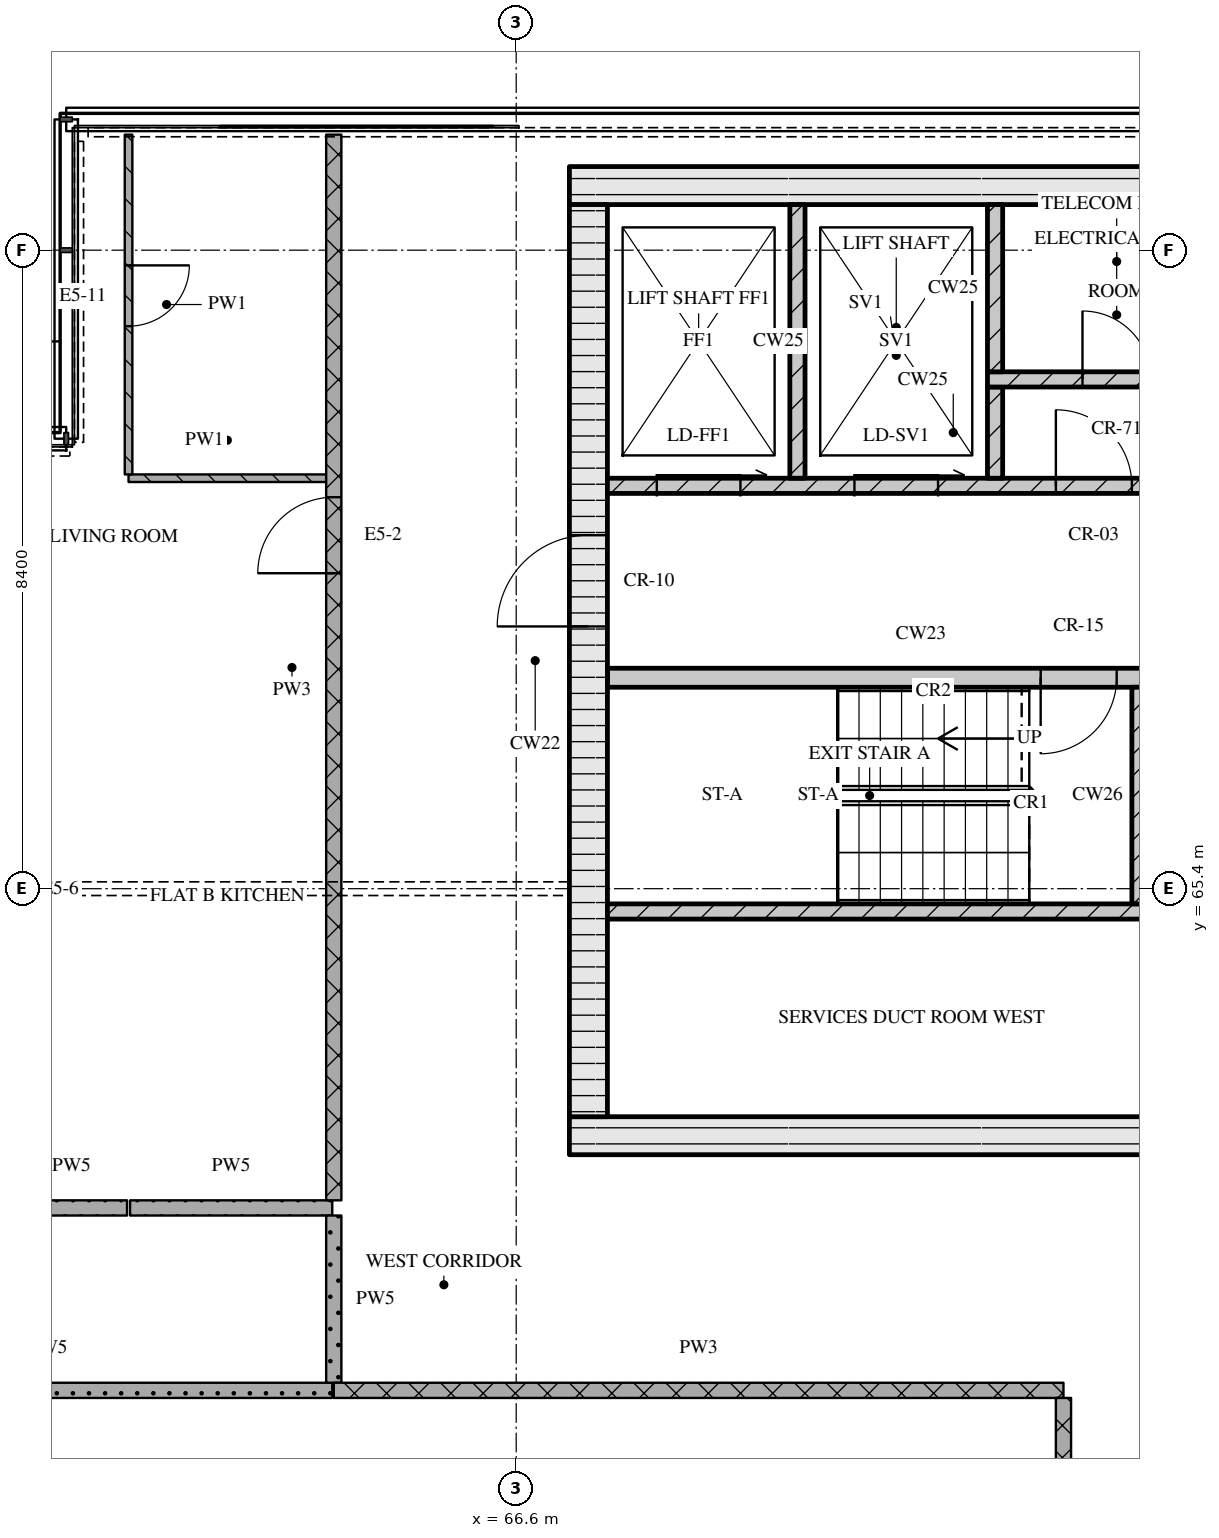
"""IFC4 building model, lengths in metres.
Left out: names, types, materials, properties, quantities, classifications, styles, units other than length and angle.
Written with IfcOpenShell. Run it as: python <this file> out.ifc"""

import sys

from ifc_helpers import new_model, si_unit, direction, frame, frame_2d, origin, place, context, subcontext, project, spatial, rectangle, extrude, element, fill, save


model = new_model("IFC4")
c1 = context("Model", 3, precision=1e-05, world=origin(), true_north=direction((0.0, 1.0)))
c2 = subcontext(c1, "Body", "Model", "MODEL_VIEW")
j1 = project(units=[si_unit("LENGTHUNIT", "METRE"), si_unit("PLANEANGLEUNIT", "RADIAN")], contexts=[c1])
p1 = place(None, origin())
s1 = spatial("IfcSite", under=j1, at=p1, CompositionType="ELEMENT")
p2 = place(p1, origin())
s2 = spatial("IfcBuilding", under=s1, at=p2, CompositionType="ELEMENT")
p3 = place(p2, frame((0.0, 0.0, 288.75)))
s3 = spatial("IfcBuildingStorey", under=s2, at=p3, CompositionType="ELEMENT", Elevation=288.75)
p4 = place(p3, frame((67.3, 62.15, 0.0), z_axis=(0.0, 0.0, 1.0), x_axis=(1.0, 0.0, 0.0)))
e1 = element("IfcWall", 1, at=p4, inside=s3, PredefinedType="SOLIDWALL", context=c2, shape_type="SweptSolid", body=[
    extrude(rectangle(XDim=40.6, YDim=0.5, at=frame_2d((20.3, 0.0))), origin(), (0.0, 0.0, 1.0), 3.32),
])
p5 = place(p4, frame((20.65, 0.0, 0.0)))
e2 = element("IfcOpeningElement", 2, at=p5, cuts=e1, PredefinedType="OPENING", context=c2, shape_type="SweptSolid", body=[
    extrude(rectangle(XDim=1.8, YDim=2.1, at=frame_2d((0.9, 1.05))), frame((0.0, 0.26, 0.0), z_axis=(0.0, -1.0, 0.0), x_axis=(1.0, 0.0, 0.0)), (0.0, 0.0, 1.0), 0.52),
])
p6 = place(p3, frame((67.3, 74.65, 0.0), z_axis=(0.0, 0.0, 1.0), x_axis=(1.0, 0.0, 0.0)))
e3 = element("IfcWall", 3, at=p6, inside=s3, PredefinedType="SOLIDWALL", context=c2, shape_type="SweptSolid", body=[
    extrude(rectangle(XDim=40.6, YDim=0.5, at=frame_2d((20.3, 0.0))), origin(), (0.0, 0.0, 1.0), 3.32),
])
p7 = place(p3, frame((67.55, 62.4, 0.0), z_axis=(0.0, 0.0, 1.0), x_axis=(0.0, 1.0, 0.0)))
e4 = element("IfcWall", 4, at=p7, inside=s3, PredefinedType="SOLIDWALL", context=c2, shape_type="SweptSolid", body=[
    extrude(rectangle(XDim=12.0, YDim=0.5, at=frame_2d((6.0, 0.0))), origin(), (0.0, 0.0, 1.0), 3.32),
])
p8 = place(p7, frame((6.45, 0.0, 0.0)))
e5 = element("IfcOpeningElement", 5, at=p8, cuts=e4, PredefinedType="OPENING", context=c2, shape_type="SweptSolid", body=[
    extrude(rectangle(XDim=1.2, YDim=2.1, at=frame_2d((0.6, 1.05))), frame((0.0, 0.26, 0.0), z_axis=(0.0, -1.0, 0.0), x_axis=(1.0, 0.0, 0.0)), (0.0, 0.0, 1.0), 0.52),
])
p9 = place(p3, frame((67.8, 65.1, 0.0), z_axis=(0.0, 0.0, 1.0), x_axis=(1.0, 0.0, 0.0)))
e6 = element("IfcWall", 6, at=p9, inside=s3, PredefinedType="SOLIDWALL", context=c2, shape_type="SweptSolid", body=[
    extrude(rectangle(XDim=18.5, YDim=0.2, at=frame_2d((9.25, 0.0))), origin(), (0.0, 0.0, 1.0), 3.32),
])
p10 = place(p9, frame((7.27, 0.0, 0.0)))
e7 = element("IfcOpeningElement", 7, at=p10, cuts=e6, PredefinedType="OPENING", context=c2, shape_type="SweptSolid", body=[
    extrude(rectangle(XDim=0.9, YDim=2.1, at=frame_2d((0.45, 1.05))), frame((0.0, 0.11, 0.0), z_axis=(0.0, -1.0, 0.0), x_axis=(1.0, 0.0, 0.0)), (0.0, 0.0, 1.0), 0.22),
])
p11 = place(p9, frame((8.95, 0.0, 0.0)))
e8 = element("IfcOpeningElement", 8, at=p11, cuts=e6, PredefinedType="OPENING", context=c2, shape_type="SweptSolid", body=[
    extrude(rectangle(XDim=0.9, YDim=2.1, at=frame_2d((0.45, 1.05))), frame((0.0, 0.11, 0.0), z_axis=(0.0, -1.0, 0.0), x_axis=(1.0, 0.0, 0.0)), (0.0, 0.0, 1.0), 0.22),
])
p12 = place(p9, frame((11.42, 0.0, 0.0)))
e9 = element("IfcOpeningElement", 9, at=p12, cuts=e6, PredefinedType="OPENING", context=c2, shape_type="SweptSolid", body=[
    extrude(rectangle(XDim=0.9, YDim=2.1, at=frame_2d((0.45, 1.05))), frame((0.0, 0.11, 0.0), z_axis=(0.0, -1.0, 0.0), x_axis=(1.0, 0.0, 0.0)), (0.0, 0.0, 1.0), 0.22),
])
p13 = place(p9, frame((13.92, 0.0, 0.0)))
e10 = element("IfcOpeningElement", 10, at=p13, cuts=e6, PredefinedType="OPENING", context=c2, shape_type="SweptSolid", body=[
    extrude(rectangle(XDim=0.9, YDim=2.1, at=frame_2d((0.45, 1.05))), frame((0.0, 0.11, 0.0), z_axis=(0.0, -1.0, 0.0), x_axis=(1.0, 0.0, 0.0)), (0.0, 0.0, 1.0), 0.22),
])
p14 = place(p9, frame((16.7, 0.0, 0.0)))
e11 = element("IfcOpeningElement", 11, at=p14, cuts=e6, PredefinedType="OPENING", context=c2, shape_type="SweptSolid", body=[
    extrude(rectangle(XDim=0.9, YDim=2.1, at=frame_2d((0.45, 1.05))), frame((0.0, 0.11, 0.0), z_axis=(0.0, -1.0, 0.0), x_axis=(1.0, 0.0, 0.0)), (0.0, 0.0, 1.0), 0.22),
])
p15 = place(p3, frame((74.85, 65.2, 0.0), z_axis=(0.0, 0.0, 1.0), x_axis=(0.0, 1.0, 0.0)))
e12 = element("IfcWall", 12, at=p15, inside=s3, PredefinedType="SOLIDWALL", context=c2, shape_type="SweptSolid", body=[
    extrude(rectangle(XDim=2.85, YDim=0.3, at=frame_2d((1.425, 0.0))), origin(), (0.0, 0.0, 1.0), 3.32),
])
p16 = place(p3, frame((67.8, 68.175, 0.0), z_axis=(0.0, 0.0, 1.0), x_axis=(1.0, 0.0, 0.0)))
e13 = element("IfcWall", 13, at=p16, inside=s3, PredefinedType="SOLIDWALL", context=c2, shape_type="SweptSolid", body=[
    extrude(rectangle(XDim=8.25, YDim=0.25, at=frame_2d((4.125, 0.0))), origin(), (0.0, 0.0, 1.0), 3.32),
])
p17 = place(p16, frame((5.7, 0.0, 0.0)))
e14 = element("IfcOpeningElement", 14, at=p17, cuts=e13, PredefinedType="OPENING", context=c2, shape_type="SweptSolid", body=[
    extrude(rectangle(XDim=1.0, YDim=2.1, at=frame_2d((0.5, 1.05))), frame((0.0, 0.135, 0.0), z_axis=(0.0, -1.0, 0.0), x_axis=(1.0, 0.0, 0.0)), (0.0, 0.0, 1.0), 0.27),
])
p18 = place(p16, frame((7.2, 0.0, 0.0)))
e15 = element("IfcOpeningElement", 15, at=p18, cuts=e13, PredefinedType="OPENING", context=c2, shape_type="SweptSolid", body=[
    extrude(rectangle(XDim=0.8, YDim=2.1, at=frame_2d((0.4, 1.05))), frame((0.0, 0.135, 0.0), z_axis=(0.0, -1.0, 0.0), x_axis=(1.0, 0.0, 0.0)), (0.0, 0.0, 1.0), 0.27),
])
p19 = place(p3, frame((67.8, 70.7, 0.0), z_axis=(0.0, 0.0, 1.0), x_axis=(1.0, 0.0, 0.0)))
e16 = element("IfcWall", 16, at=p19, inside=s3, PredefinedType="SOLIDWALL", context=c2, shape_type="SweptSolid", body=[
    extrude(rectangle(XDim=39.6, YDim=0.2, at=frame_2d((19.8, 0.0))), origin(), (0.0, 0.0, 1.0), 3.32),
])
p20 = place(p19, frame((0.65, 0.0, 0.0)))
e17 = element("IfcOpeningElement", 17, at=p20, cuts=e16, PredefinedType="OPENING", context=c2, shape_type="SweptSolid", body=[
    extrude(rectangle(XDim=1.1, YDim=2.1, at=frame_2d((0.55, 1.05))), frame((0.0, 0.11, 0.0), z_axis=(0.0, -1.0, 0.0), x_axis=(1.0, 0.0, 0.0)), (0.0, 0.0, 1.0), 0.22),
])
p21 = place(p19, frame((3.25, 0.0, 0.0)))
e18 = element("IfcOpeningElement", 18, at=p21, cuts=e16, PredefinedType="OPENING", context=c2, shape_type="SweptSolid", body=[
    extrude(rectangle(XDim=1.1, YDim=2.1, at=frame_2d((0.55, 1.05))), frame((0.0, 0.11, 0.0), z_axis=(0.0, -1.0, 0.0), x_axis=(1.0, 0.0, 0.0)), (0.0, 0.0, 1.0), 0.22),
])
p22 = place(p19, frame((5.9, 0.0, 0.0)))
e19 = element("IfcOpeningElement", 19, at=p22, cuts=e16, PredefinedType="OPENING", context=c2, shape_type="SweptSolid", body=[
    extrude(rectangle(XDim=1.0, YDim=2.1, at=frame_2d((0.5, 1.05))), frame((0.0, 0.11, 0.0), z_axis=(0.0, -1.0, 0.0), x_axis=(1.0, 0.0, 0.0)), (0.0, 0.0, 1.0), 0.22),
])
p23 = place(p19, frame((21.7, 0.0, 0.0)))
e20 = element("IfcOpeningElement", 20, at=p23, cuts=e16, PredefinedType="OPENING", context=c2, shape_type="SweptSolid", body=[
    extrude(rectangle(XDim=1.0, YDim=2.1, at=frame_2d((0.5, 1.05))), frame((0.0, 0.11, 0.0), z_axis=(0.0, -1.0, 0.0), x_axis=(1.0, 0.0, 0.0)), (0.0, 0.0, 1.0), 0.22),
])
p24 = place(p19, frame((32.7, 0.0, 0.0)))
e21 = element("IfcOpeningElement", 21, at=p24, cuts=e16, PredefinedType="OPENING", context=c2, shape_type="SweptSolid", body=[
    extrude(rectangle(XDim=1.0, YDim=2.1, at=frame_2d((0.5, 1.05))), frame((0.0, 0.11, 0.0), z_axis=(0.0, -1.0, 0.0), x_axis=(1.0, 0.0, 0.0)), (0.0, 0.0, 1.0), 0.22),
])
p25 = place(p19, frame((35.25, 0.0, 0.0)))
e22 = element("IfcOpeningElement", 22, at=p25, cuts=e16, PredefinedType="OPENING", context=c2, shape_type="SweptSolid", body=[
    extrude(rectangle(XDim=1.1, YDim=2.1, at=frame_2d((0.55, 1.05))), frame((0.0, 0.11, 0.0), z_axis=(0.0, -1.0, 0.0), x_axis=(1.0, 0.0, 0.0)), (0.0, 0.0, 1.0), 0.22),
])
p26 = place(p19, frame((37.85, 0.0, 0.0)))
e23 = element("IfcOpeningElement", 23, at=p26, cuts=e16, PredefinedType="OPENING", context=c2, shape_type="SweptSolid", body=[
    extrude(rectangle(XDim=1.1, YDim=2.1, at=frame_2d((0.55, 1.05))), frame((0.0, 0.11, 0.0), z_axis=(0.0, -1.0, 0.0), x_axis=(1.0, 0.0, 0.0)), (0.0, 0.0, 1.0), 0.22),
])
p27 = place(p3, frame((70.3, 70.8, 0.0), z_axis=(0.0, 0.0, 1.0), x_axis=(0.0, 1.0, 0.0)))
e24 = element("IfcWall", 24, at=p27, inside=s3, PredefinedType="SOLIDWALL", context=c2, shape_type="SweptSolid", body=[
    extrude(rectangle(XDim=3.6, YDim=0.2, at=frame_2d((1.8, 0.0))), origin(), (0.0, 0.0, 1.0), 3.32),
])
p28 = place(p3, frame((72.9, 70.8, 0.0), z_axis=(0.0, 0.0, 1.0), x_axis=(0.0, 1.0, 0.0)))
e25 = element("IfcWall", 25, at=p28, inside=s3, PredefinedType="SOLIDWALL", context=c2, shape_type="SweptSolid", body=[
    extrude(rectangle(XDim=1.2, YDim=0.2, at=frame_2d((0.6, 0.0))), origin(), (0.0, 0.0, 1.0), 3.32),
])
p29 = place(p3, frame((72.8, 72.1, 0.0), z_axis=(0.0, 0.0, 1.0), x_axis=(1.0, 0.0, 0.0)))
e26 = element("IfcWall", 26, at=p29, inside=s3, PredefinedType="SOLIDWALL", context=c2, shape_type="SweptSolid", body=[
    extrude(rectangle(XDim=11.0, YDim=0.2, at=frame_2d((5.5, 0.0))), origin(), (0.0, 0.0, 1.0), 3.32),
])
p30 = place(p29, frame((1.25, 0.0, 0.0)))
e27 = element("IfcOpeningElement", 27, at=p30, cuts=e26, PredefinedType="OPENING", context=c2, shape_type="SweptSolid", body=[
    extrude(rectangle(XDim=0.9, YDim=2.1, at=frame_2d((0.45, 1.05))), frame((0.0, 0.11, 0.0), z_axis=(0.0, -1.0, 0.0), x_axis=(1.0, 0.0, 0.0)), (0.0, 0.0, 1.0), 0.22),
])
p31 = place(p29, frame((3.85, 0.0, 0.0)))
e28 = element("IfcOpeningElement", 28, at=p31, cuts=e26, PredefinedType="OPENING", context=c2, shape_type="SweptSolid", body=[
    extrude(rectangle(XDim=0.9, YDim=2.1, at=frame_2d((0.45, 1.05))), frame((0.0, 0.11, 0.0), z_axis=(0.0, -1.0, 0.0), x_axis=(1.0, 0.0, 0.0)), (0.0, 0.0, 1.0), 0.22),
])
p32 = place(p29, frame((6.42, 0.0, 0.0)))
e29 = element("IfcOpeningElement", 29, at=p32, cuts=e26, PredefinedType="OPENING", context=c2, shape_type="SweptSolid", body=[
    extrude(rectangle(XDim=0.9, YDim=2.1, at=frame_2d((0.45, 1.05))), frame((0.0, 0.11, 0.0), z_axis=(0.0, -1.0, 0.0), x_axis=(1.0, 0.0, 0.0)), (0.0, 0.0, 1.0), 0.22),
])
p33 = place(p29, frame((9.195, 0.0, 0.0)))
e30 = element("IfcOpeningElement", 30, at=p33, cuts=e26, PredefinedType="OPENING", context=c2, shape_type="SweptSolid", body=[
    extrude(rectangle(XDim=0.9, YDim=2.1, at=frame_2d((0.45, 1.05))), frame((0.0, 0.11, 0.0), z_axis=(0.0, -1.0, 0.0), x_axis=(1.0, 0.0, 0.0)), (0.0, 0.0, 1.0), 0.22),
])
p34 = place(p3, frame((72.9, 72.2, 0.0), z_axis=(0.0, 0.0, 1.0), x_axis=(0.0, 1.0, 0.0)))
e31 = element("IfcWall", 31, at=p34, inside=s3, PredefinedType="SOLIDWALL", context=c2, shape_type="SweptSolid", body=[
    extrude(rectangle(XDim=2.2, YDim=0.2, at=frame_2d((1.1, 0.0))), origin(), (0.0, 0.0, 1.0), 3.32),
])
p35 = place(p3, frame((64.2, 58.8, 0.0), z_axis=(0.0, 0.0, 1.0), x_axis=(1.0, 0.0, 0.0)))
e32 = element("IfcWall", 32, at=p35, inside=s3, PredefinedType="PARTITIONING", context=c2, shape_type="SweptSolid", body=[
    extrude(rectangle(XDim=9.6, YDim=0.2, at=frame_2d((4.8, 0.0))), origin(), (0.0, 0.0, 1.0), 3.32),
])
p36 = place(p3, frame((56.7, 58.8, 0.0), z_axis=(0.0, 0.0, 1.0), x_axis=(1.0, 0.0, 0.0)))
e33 = element("IfcWall", 33, at=p36, inside=s3, PredefinedType="PARTITIONING", context=c2, shape_type="SweptSolid", body=[
    extrude(rectangle(XDim=7.48, YDim=0.2, at=frame_2d((3.74, 0.0))), origin(), (0.0, 0.0, 1.0), 3.32),
])
p37 = place(p3, frame((60.02, 61.2, 0.0), z_axis=(0.0, 0.0, 1.0), x_axis=(1.0, 0.0, 0.0)))
e34 = element("IfcWall", 34, at=p37, inside=s3, PredefinedType="PARTITIONING", context=c2, shape_type="SweptSolid", body=[
    extrude(rectangle(XDim=1.46, YDim=0.2, at=frame_2d((0.73, 0.0))), origin(), (0.0, 0.0, 1.0), 3.32),
])
p38 = place(p3, frame((61.52, 61.2, 0.0), z_axis=(0.0, 0.0, 1.0), x_axis=(1.0, 0.0, 0.0)))
e35 = element("IfcWall", 35, at=p38, inside=s3, PredefinedType="PARTITIONING", context=c2, shape_type="SweptSolid", body=[
    extrude(rectangle(XDim=2.66, YDim=0.2, at=frame_2d((1.33, 0.0))), origin(), (0.0, 0.0, 1.0), 3.32),
])
p39 = place(p3, frame((61.5, 70.8, 0.0), z_axis=(0.0, 0.0, 1.0), x_axis=(1.0, 0.0, 0.0)))
e36 = element("IfcWall", 36, at=p39, inside=s3, PredefinedType="PARTITIONING", context=c2, shape_type="SweptSolid", body=[
    extrude(rectangle(XDim=2.6, YDim=0.1, at=frame_2d((1.3, 0.0))), origin(), (0.0, 0.0, 1.0), 3.32),
])
p40 = place(p3, frame((61.5, 75.32, 0.0), z_axis=(0.0, 0.0, 1.0), x_axis=(0.0, -1.0, 0.0)))
e37 = element("IfcWall", 37, at=p40, inside=s3, PredefinedType="PARTITIONING", context=c2, shape_type="SweptSolid", body=[
    extrude(rectangle(XDim=4.47, YDim=0.1, at=frame_2d((2.235, 0.0))), origin(), (0.0, 0.0, 1.0), 3.32),
])
p41 = place(p40, frame((1.72, 0.0, 0.0)))
e38 = element("IfcOpeningElement", 38, at=p41, cuts=e37, PredefinedType="OPENING", context=c2, shape_type="SweptSolid", body=[
    extrude(rectangle(XDim=0.8, YDim=2.1, at=frame_2d((0.4, 1.05))), frame((0.0, 0.06, 0.0), z_axis=(0.0, -1.0, 0.0), x_axis=(1.0, 0.0, 0.0)), (0.0, 0.0, 1.0), 0.12),
])
p42 = place(p3, frame((64.2, 61.3, 0.0), z_axis=(0.0, 0.0, 1.0), x_axis=(0.0, 1.0, 0.0)))
e39 = element("IfcWall", 39, at=p42, inside=s3, PredefinedType="PARTITIONING", context=c2, shape_type="SweptSolid", body=[
    extrude(rectangle(XDim=14.02, YDim=0.2, at=frame_2d((7.01, 0.0))), origin(), (0.0, 0.0, 1.0), 3.32),
])
p43 = place(p42, frame((8.25, 0.0, 0.0)))
e40 = element("IfcOpeningElement", 40, at=p43, cuts=e39, PredefinedType="OPENING", context=c2, shape_type="SweptSolid", body=[
    extrude(rectangle(XDim=1.0, YDim=2.1, at=frame_2d((0.5, 1.05))), frame((0.0, 0.11, 0.0), z_axis=(0.0, -1.0, 0.0), x_axis=(1.0, 0.0, 0.0)), (0.0, 0.0, 1.0), 0.22),
])
p44 = place(p3, frame((64.2, 61.1, 0.0), z_axis=(0.0, 0.0, 1.0), x_axis=(0.0, -1.0, 0.0)))
e41 = element("IfcWall", 41, at=p44, inside=s3, PredefinedType="PARTITIONING", context=c2, shape_type="SweptSolid", body=[
    extrude(rectangle(XDim=2.2, YDim=0.2, at=frame_2d((1.1, 0.0))), origin(), (0.0, 0.0, 1.0), 3.32),
])
p45 = place(p3, frame((73.8, 50.7, 0.0), z_axis=(0.0, 0.0, 1.0), x_axis=(0.0, 1.0, 0.0)))
e42 = element("IfcWall", 42, at=p45, inside=s3, PredefinedType="PARTITIONING", context=c2, shape_type="SweptSolid", body=[
    extrude(rectangle(XDim=8.0, YDim=0.2, at=frame_2d((4.0, 0.0))), origin(), (0.0, 0.0, 1.0), 3.32),
])
p46 = place(p45, frame((4.15, 0.0, 0.0)))
e43 = element("IfcOpeningElement", 43, at=p46, cuts=e42, PredefinedType="OPENING", context=c2, shape_type="SweptSolid", body=[
    extrude(rectangle(XDim=1.0, YDim=2.1, at=frame_2d((0.5, 1.05))), frame((0.0, 0.11, 0.0), z_axis=(0.0, -1.0, 0.0), x_axis=(1.0, 0.0, 0.0)), (0.0, 0.0, 1.0), 0.22),
])
p47 = place(p17, origin())
e44 = element("IfcDoor", 44, at=p47, inside=s3, OperationType="SINGLE_SWING_RIGHT", PredefinedType="DOOR", context=c2, shape_type="SweptSolid", body=[
    extrude(rectangle(XDim=1.0, YDim=2.1, at=frame_2d((0.5, 1.05))), frame((0.0, 0.025, 0.0), z_axis=(0.0, -1.0, 0.0), x_axis=(1.0, 0.0, 0.0)), (0.0, 0.0, 1.0), 0.05),
])
fill(e14, e44)
p48 = place(p8, origin())
e45 = element("IfcDoor", 45, at=p48, inside=s3, OperationType="SINGLE_SWING_LEFT", PredefinedType="DOOR", context=c2, shape_type="SweptSolid", body=[
    extrude(rectangle(XDim=1.2, YDim=2.1, at=frame_2d((0.6, 1.05))), frame((0.0, 0.025, 0.0), z_axis=(0.0, -1.0, 0.0), x_axis=(1.0, 0.0, 0.0)), (0.0, 0.0, 1.0), 0.05),
])
fill(e5, e45)
p49 = place(p20, origin())
e46 = element("IfcDoor", 46, at=p49, inside=s3, OperationType="SLIDING_TO_RIGHT", PredefinedType="DOOR", context=c2, shape_type="SweptSolid", body=[
    extrude(rectangle(XDim=1.1, YDim=2.1, at=frame_2d((0.55, 1.05))), frame((0.0, 0.025, 0.0), z_axis=(0.0, -1.0, 0.0), x_axis=(1.0, 0.0, 0.0)), (0.0, 0.0, 1.0), 0.05),
])
fill(e17, e46)
p50 = place(p21, origin())
e47 = element("IfcDoor", 47, at=p50, inside=s3, OperationType="SLIDING_TO_RIGHT", PredefinedType="DOOR", context=c2, shape_type="SweptSolid", body=[
    extrude(rectangle(XDim=1.1, YDim=2.1, at=frame_2d((0.55, 1.05))), frame((0.0, 0.025, 0.0), z_axis=(0.0, -1.0, 0.0), x_axis=(1.0, 0.0, 0.0)), (0.0, 0.0, 1.0), 0.05),
])
fill(e18, e47)
p51 = place(p22, origin())
e48 = element("IfcDoor", 48, at=p51, inside=s3, OperationType="SINGLE_SWING_LEFT", PredefinedType="DOOR", context=c2, shape_type="SweptSolid", body=[
    extrude(rectangle(XDim=1.0, YDim=2.1, at=frame_2d((0.5, 1.05))), frame((0.0, 0.025, 0.0), z_axis=(0.0, -1.0, 0.0), x_axis=(1.0, 0.0, 0.0)), (0.0, 0.0, 1.0), 0.05),
])
fill(e19, e48)
p52 = place(p30, origin())
e49 = element("IfcDoor", 49, at=p52, inside=s3, OperationType="SINGLE_SWING_LEFT", PredefinedType="DOOR", context=c2, shape_type="SweptSolid", body=[
    extrude(rectangle(XDim=0.9, YDim=2.1, at=frame_2d((0.45, 1.05))), frame((0.0, 0.025, 0.0), z_axis=(0.0, -1.0, 0.0), x_axis=(1.0, 0.0, 0.0)), (0.0, 0.0, 1.0), 0.05),
])
fill(e27, e49)
p53 = place(p41, origin())
e50 = element("IfcDoor", 50, at=p53, inside=s3, OperationType="SINGLE_SWING_LEFT", PredefinedType="DOOR", context=c2, shape_type="SweptSolid", body=[
    extrude(rectangle(XDim=0.8, YDim=2.1, at=frame_2d((0.4, 1.05))), frame((0.0, 0.025, 0.0), z_axis=(0.0, -1.0, 0.0), x_axis=(1.0, 0.0, 0.0)), (0.0, 0.0, 1.0), 0.05),
])
fill(e38, e50)
p54 = place(p43, origin())
e51 = element("IfcDoor", 51, at=p54, inside=s3, OperationType="SINGLE_SWING_LEFT", PredefinedType="DOOR", context=c2, shape_type="SweptSolid", body=[
    extrude(rectangle(XDim=1.0, YDim=2.1, at=frame_2d((0.5, 1.05))), frame((0.0, 0.025, 0.0), z_axis=(0.0, -1.0, 0.0), x_axis=(1.0, 0.0, 0.0)), (0.0, 0.0, 1.0), 0.05),
])
fill(e40, e51)
save(model, sys.argv[1])
